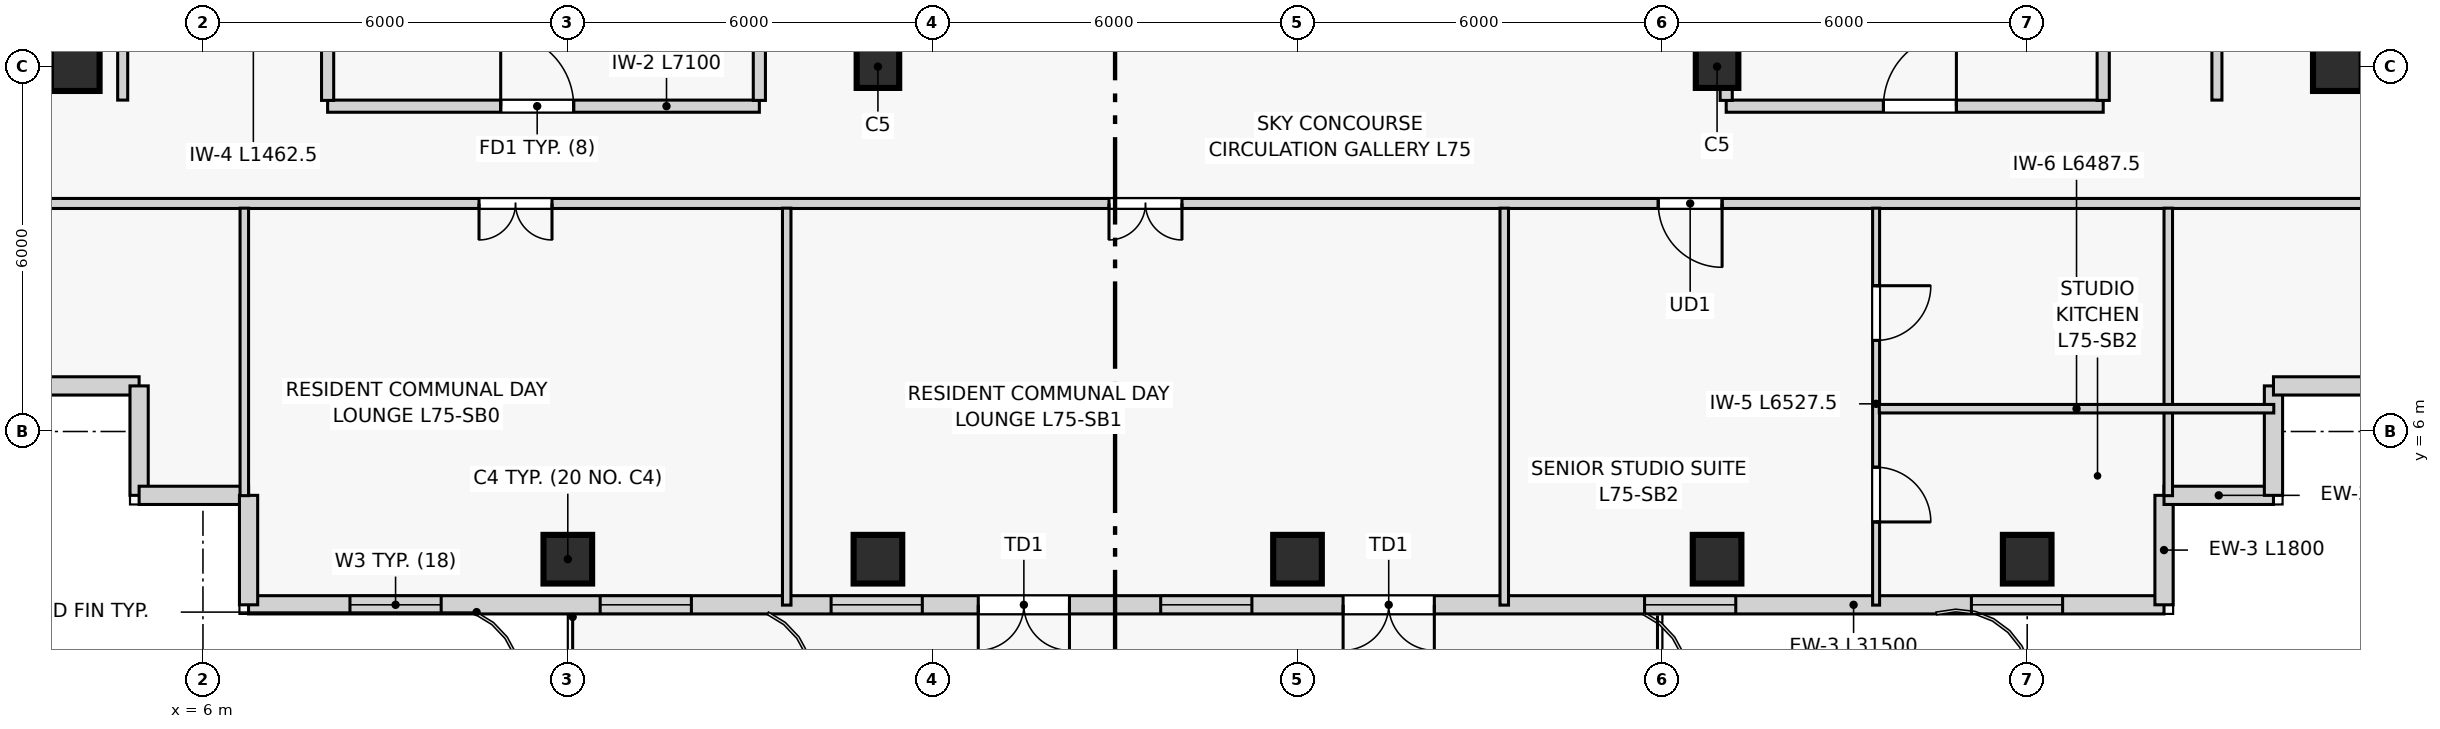
"""IFC4 building model, lengths in metres.
Left out: names, types, materials, properties, quantities, classifications, styles, units other than length and angle.
Written with IfcOpenShell. Run it as: python <this file> out.ifc"""

import sys

from ifc_helpers import new_model, si_unit, direction, frame, frame_2d, origin, origin_2d, place, context, subcontext, project, spatial, rectangle, extrude, source, transform, mapped, element, fill, save


model = new_model("IFC4")
c1 = context("Model", 3, precision=1e-05, world=origin(), true_north=direction((0.0, 1.0)))
c2 = subcontext(c1, "Body", "Model", "MODEL_VIEW")
j1 = project(units=[si_unit("LENGTHUNIT", "METRE"), si_unit("PLANEANGLEUNIT", "RADIAN")], contexts=[c1])
p1 = place(None, origin())
s1 = spatial("IfcSite", under=j1, at=p1, CompositionType="ELEMENT")
p2 = place(p1, origin())
s2 = spatial("IfcBuilding", under=s1, at=p2, CompositionType="ELEMENT")
p3 = place(p2, frame((0.0, 0.0, 285.3)))
s3 = spatial("IfcBuildingStorey", under=s2, at=p3, CompositionType="ELEMENT", Elevation=285.3)
m1 = source(origin(), c2, "Body", "SweptSolid", [
    extrude(rectangle(XDim=0.8, YDim=0.8, at=origin_2d()), origin(), (0.0, 0.0, 1.0), 4.2),
])
for number, where, z_axis, x_axis in (
    (1, (12.0, 3.9, 0.0), (0.0, 0.0, 1.0), (1.0, 0.0, 0.0)),
    (2, (17.1, 3.9, 0.0), (0.0, 0.0, 1.0), (1.0, 0.0, 0.0)),
    (3, (24.0, 3.9, 0.0), (0.0, 0.0, 1.0), (1.0, 0.0, 0.0)),
    (4, (30.9, 3.9, 0.0), (0.0, 0.0, 1.0), (1.0, 0.0, 0.0)),
    (5, (36.0, 3.9, 0.0), (0.0, 0.0, 1.0), (1.0, 0.0, 0.0)),
    (6, (3.9, 12.0, 0.0), (0.0, 0.0, 1.0), (1.0, 0.0, 0.0)),
    (7, (41.1, 12.0, 0.0), (0.0, 0.0, 1.0), (1.0, 0.0, 0.0)),
):
    element("IfcColumn", number, at=place(p3, frame(where, z_axis=z_axis, x_axis=x_axis)), inside=s3, PredefinedType="COLUMN", context=c2, shape_type="MappedRepresentation", body=[
        mapped(m1, transform((0.0, 0.0, 0.0), scale=1.0)),
    ])
m2 = source(origin(), c2, "Body", "SweptSolid", [
    extrude(rectangle(XDim=0.7, YDim=0.7, at=origin_2d()), origin(), (0.0, 0.0, 1.0), 4.2),
])
for number, where, z_axis, x_axis in (
    (8, (17.1, 12.0, 0.0), (0.0, 0.0, 1.0), (1.0, 0.0, 0.0)),
    (9, (30.9, 12.0, 0.0), (0.0, 0.0, 1.0), (1.0, 0.0, 0.0)),
):
    element("IfcColumn", number, at=place(p3, frame(where, z_axis=z_axis, x_axis=x_axis)), inside=s3, PredefinedType="COLUMN", context=c2, shape_type="MappedRepresentation", body=[
        mapped(m2, transform((0.0, 0.0, 0.0), scale=1.0)),
    ])
p4 = place(p3, frame((6.75, 3.15, 0.0), z_axis=(0.0, 0.0, 1.0), x_axis=(1.0, 0.0, 0.0)))
e10 = element("IfcWall", 10, at=p4, inside=s3, PredefinedType="SOLIDWALL", context=c2, shape_type="SweptSolid", body=[
    extrude(rectangle(XDim=31.5, YDim=0.3, at=frame_2d((15.75, 0.0))), origin(), (0.0, 0.0, 1.0), 3.92),
])
p5 = place(p4, frame((1.667, 0.0, 0.85)))
e11 = element("IfcOpeningElement", 11, at=p5, cuts=e10, PredefinedType="OPENING", context=c2, shape_type="SweptSolid", body=[
    extrude(rectangle(XDim=1.5, YDim=1.8, at=frame_2d((0.75, 0.9))), frame((0.0, 0.16, 0.0), z_axis=(0.0, -1.0, 0.0), x_axis=(1.0, 0.0, 0.0)), (0.0, 0.0, 1.0), 0.32),
])
p6 = place(p4, frame((5.782, 0.0, 0.85)))
e12 = element("IfcOpeningElement", 12, at=p6, cuts=e10, PredefinedType="OPENING", context=c2, shape_type="SweptSolid", body=[
    extrude(rectangle(XDim=1.5, YDim=1.8, at=frame_2d((0.75, 0.9))), frame((0.0, 0.16, 0.0), z_axis=(0.0, -1.0, 0.0), x_axis=(1.0, 0.0, 0.0)), (0.0, 0.0, 1.0), 0.32),
])
p7 = place(p4, frame((9.58, 0.0, 0.85)))
e13 = element("IfcOpeningElement", 13, at=p7, cuts=e10, PredefinedType="OPENING", context=c2, shape_type="SweptSolid", body=[
    extrude(rectangle(XDim=1.5, YDim=1.8, at=frame_2d((0.75, 0.9))), frame((0.0, 0.16, 0.0), z_axis=(0.0, -1.0, 0.0), x_axis=(1.0, 0.0, 0.0)), (0.0, 0.0, 1.0), 0.32),
])
p8 = place(p4, frame((15.0, 0.0, 0.85)))
e14 = element("IfcOpeningElement", 14, at=p8, cuts=e10, PredefinedType="OPENING", context=c2, shape_type="SweptSolid", body=[
    extrude(rectangle(XDim=1.5, YDim=1.8, at=frame_2d((0.75, 0.9))), frame((0.0, 0.16, 0.0), z_axis=(0.0, -1.0, 0.0), x_axis=(1.0, 0.0, 0.0)), (0.0, 0.0, 1.0), 0.32),
])
p9 = place(p4, frame((22.958, 0.0, 0.85)))
e15 = element("IfcOpeningElement", 15, at=p9, cuts=e10, PredefinedType="OPENING", context=c2, shape_type="SweptSolid", body=[
    extrude(rectangle(XDim=1.5, YDim=1.8, at=frame_2d((0.75, 0.9))), frame((0.0, 0.16, 0.0), z_axis=(0.0, -1.0, 0.0), x_axis=(1.0, 0.0, 0.0)), (0.0, 0.0, 1.0), 0.32),
])
p10 = place(p4, frame((28.333, 0.0, 0.85)))
e16 = element("IfcOpeningElement", 16, at=p10, cuts=e10, PredefinedType="OPENING", context=c2, shape_type="SweptSolid", body=[
    extrude(rectangle(XDim=1.5, YDim=1.8, at=frame_2d((0.75, 0.9))), frame((0.0, 0.16, 0.0), z_axis=(0.0, -1.0, 0.0), x_axis=(1.0, 0.0, 0.0)), (0.0, 0.0, 1.0), 0.32),
])
p11 = place(p4, frame((12.0, 0.0, 0.0)))
e17 = element("IfcOpeningElement", 17, at=p11, cuts=e10, PredefinedType="OPENING", context=c2, shape_type="SweptSolid", body=[
    extrude(rectangle(XDim=1.5, YDim=2.3, at=frame_2d((0.75, 1.15))), frame((0.0, 0.16, 0.0), z_axis=(0.0, -1.0, 0.0), x_axis=(1.0, 0.0, 0.0)), (0.0, 0.0, 1.0), 0.32),
])
p12 = place(p4, frame((18.0, 0.0, 0.0)))
e18 = element("IfcOpeningElement", 18, at=p12, cuts=e10, PredefinedType="OPENING", context=c2, shape_type="SweptSolid", body=[
    extrude(rectangle(XDim=1.5, YDim=2.3, at=frame_2d((0.75, 1.15))), frame((0.0, 0.16, 0.0), z_axis=(0.0, -1.0, 0.0), x_axis=(1.0, 0.0, 0.0)), (0.0, 0.0, 1.0), 0.32),
])
for number, where, z_axis, x_axis in (
    (19, (38.25, 3.15, 0.0), (0.0, 0.0, 1.0), (0.0, 1.0, 0.0)),
    (20, (38.25, 4.95, 0.0), (0.0, 0.0, 1.0), (1.0, 0.0, 0.0)),
    (21, (40.05, 4.95, 0.0), (0.0, 0.0, 1.0), (0.0, 1.0, 0.0)),
    (22, (40.05, 6.75, 0.0), (0.0, 0.0, 1.0), (1.0, 0.0, 0.0)),
    (23, (3.15, 6.75, 0.0), (0.0, 0.0, 1.0), (1.0, 0.0, 0.0)),
    (24, (4.95, 6.75, 0.0), (0.0, 0.0, 1.0), (0.0, -1.0, 0.0)),
    (25, (4.95, 4.95, 0.0), (0.0, 0.0, 1.0), (1.0, 0.0, 0.0)),
    (26, (6.75, 4.95, 0.0), (0.0, 0.0, 1.0), (0.0, -1.0, 0.0)),
):
    element("IfcWall", number, at=place(p3, frame(where, z_axis=z_axis, x_axis=x_axis)), inside=s3, PredefinedType="SOLIDWALL", context=c2, shape_type="SweptSolid", body=[
        extrude(rectangle(XDim=1.8, YDim=0.3, at=frame_2d((0.9, 0.0))), origin(), (0.0, 0.0, 1.0), 3.92),
    ])
p13 = place(p3, frame((8.05, 11.35, 0.0), z_axis=(0.0, 0.0, 1.0), x_axis=(1.0, 0.0, 0.0)))
e27 = element("IfcWall", 27, at=p13, inside=s3, PredefinedType="PARTITIONING", context=c2, shape_type="SweptSolid", body=[
    extrude(rectangle(XDim=7.1, YDim=0.2, at=frame_2d((3.55, 0.0))), origin(), (0.0, 0.0, 1.0), 3.92),
])
p14 = place(p13, frame((2.846, 0.0, 0.0)))
e28 = element("IfcOpeningElement", 28, at=p14, cuts=e27, PredefinedType="OPENING", context=c2, shape_type="SweptSolid", body=[
    extrude(rectangle(XDim=1.2, YDim=2.2, at=frame_2d((0.6, 1.1))), frame((0.0, 0.11, 0.0), z_axis=(0.0, -1.0, 0.0), x_axis=(1.0, 0.0, 0.0)), (0.0, 0.0, 1.0), 0.22),
])
for number, where, z_axis, x_axis in (
    (29, (8.05, 11.445, 0.0), (0.0, 0.0, 1.0), (0.0, 1.0, 0.0)),
    (30, (15.15, 11.445, 0.0), (0.0, 0.0, 1.0), (0.0, 1.0, 0.0)),
):
    element("IfcWall", number, at=place(p3, frame(where, z_axis=z_axis, x_axis=x_axis)), inside=s3, PredefinedType="PARTITIONING", context=c2, shape_type="SweptSolid", body=[
        extrude(rectangle(XDim=3.335, YDim=0.2, at=frame_2d((1.667, 0.0))), origin(), (0.0, 0.0, 1.0), 3.92),
    ])
p15 = place(p3, frame((31.05, 11.35, 0.0), z_axis=(0.0, 0.0, 1.0), x_axis=(1.0, 0.0, 0.0)))
e31 = element("IfcWall", 31, at=p15, inside=s3, PredefinedType="PARTITIONING", context=c2, shape_type="SweptSolid", body=[
    extrude(rectangle(XDim=6.2, YDim=0.2, at=frame_2d((3.1, 0.0))), origin(), (0.0, 0.0, 1.0), 3.92),
])
p16 = place(p15, frame((2.586, 0.0, 0.0)))
e32 = element("IfcOpeningElement", 32, at=p16, cuts=e31, PredefinedType="OPENING", context=c2, shape_type="SweptSolid", body=[
    extrude(rectangle(XDim=1.2, YDim=2.2, at=frame_2d((0.6, 1.1))), frame((0.0, 0.11, 0.0), z_axis=(0.0, -1.0, 0.0), x_axis=(1.0, 0.0, 0.0)), (0.0, 0.0, 1.0), 0.22),
])
p17 = place(p3, frame((31.05, 11.445, 0.0), z_axis=(0.0, 0.0, 1.0), x_axis=(0.0, 1.0, 0.0)))
e33 = element("IfcWall", 33, at=p17, inside=s3, PredefinedType="PARTITIONING", context=c2, shape_type="SweptSolid", body=[
    extrude(rectangle(XDim=3.335, YDim=0.2, at=frame_2d((1.667, 0.0))), origin(), (0.0, 0.0, 1.0), 3.07),
])
p18 = place(p3, frame((37.25, 11.445, 0.0), z_axis=(0.0, 0.0, 1.0), x_axis=(0.0, 1.0, 0.0)))
e34 = element("IfcWall", 34, at=p18, inside=s3, PredefinedType="PARTITIONING", context=c2, shape_type="SweptSolid", body=[
    extrude(rectangle(XDim=3.335, YDim=0.2, at=frame_2d((1.667, 0.0))), origin(), (0.0, 0.0, 1.0), 3.92),
])
p19 = place(p3, frame((3.145, 9.75, 0.0), z_axis=(0.0, 0.0, 1.0), x_axis=(1.0, 0.0, 0.0)))
e35 = element("IfcWall", 35, at=p19, inside=s3, PredefinedType="PARTITIONING", context=c2, shape_type="SweptSolid", body=[
    extrude(rectangle(XDim=38.71, YDim=0.165, at=frame_2d((19.355, 0.0))), origin(), (0.0, 0.0, 1.0), 3.92),
])
p20 = place(p19, frame((7.395, 0.0, 0.0)))
e36 = element("IfcOpeningElement", 36, at=p20, cuts=e35, PredefinedType="OPENING", context=c2, shape_type="SweptSolid", body=[
    extrude(rectangle(XDim=1.2, YDim=2.2, at=frame_2d((0.6, 1.1))), frame((0.0, 0.093, 0.0), z_axis=(0.0, -1.0, 0.0), x_axis=(1.0, 0.0, 0.0)), (0.0, 0.0, 1.0), 0.185),
])
p21 = place(p19, frame((17.755, 0.0, 0.0)))
e37 = element("IfcOpeningElement", 37, at=p21, cuts=e35, PredefinedType="OPENING", context=c2, shape_type="SweptSolid", body=[
    extrude(rectangle(XDim=1.2, YDim=2.2, at=frame_2d((0.6, 1.1))), frame((0.0, 0.093, 0.0), z_axis=(0.0, -1.0, 0.0), x_axis=(1.0, 0.0, 0.0)), (0.0, 0.0, 1.0), 0.185),
])
p22 = place(p19, frame((26.788, 0.0, 0.0)))
e38 = element("IfcOpeningElement", 38, at=p22, cuts=e35, PredefinedType="OPENING", context=c2, shape_type="SweptSolid", body=[
    extrude(rectangle(XDim=1.05, YDim=2.15, at=frame_2d((0.525, 1.075))), frame((0.0, 0.093, 0.0), z_axis=(0.0, -1.0, 0.0), x_axis=(1.0, 0.0, 0.0)), (0.0, 0.0, 1.0), 0.185),
])
p23 = place(p3, frame((4.68, 11.45, 0.0), z_axis=(0.0, 0.0, 1.0), x_axis=(0.0, 1.0, 0.0)))
e39 = element("IfcWall", 39, at=p23, inside=s3, PredefinedType="PARTITIONING", context=c2, shape_type="SweptSolid", body=[
    extrude(rectangle(XDim=3.7, YDim=0.165, at=frame_2d((1.85, 0.0))), origin(), (0.0, 0.0, 1.0), 3.92),
])
p24 = place(p23, frame((1.475, 0.0, 0.0)))
e40 = element("IfcOpeningElement", 40, at=p24, cuts=e39, PredefinedType="OPENING", context=c2, shape_type="SweptSolid", body=[
    extrude(rectangle(XDim=0.95, YDim=2.1, at=frame_2d((0.475, 1.05))), frame((0.0, 0.093, 0.0), z_axis=(0.0, -1.0, 0.0), x_axis=(1.0, 0.0, 0.0)), (0.0, 0.0, 1.0), 0.185),
])
p25 = place(p3, frame((39.12, 11.45, 0.0), z_axis=(0.0, 0.0, 1.0), x_axis=(0.0, 1.0, 0.0)))
e41 = element("IfcWall", 41, at=p25, inside=s3, PredefinedType="PARTITIONING", context=c2, shape_type="SweptSolid", body=[
    extrude(rectangle(XDim=18.9, YDim=0.165, at=frame_2d((9.45, 0.0))), origin(), (0.0, 0.0, 1.0), 3.92),
])
p26 = place(p25, frame((2.05, 0.0, 0.0)))
e42 = element("IfcOpeningElement", 42, at=p26, cuts=e41, PredefinedType="OPENING", context=c2, shape_type="SweptSolid", body=[
    extrude(rectangle(XDim=0.95, YDim=2.1, at=frame_2d((0.475, 1.05))), frame((0.0, 0.093, 0.0), z_axis=(0.0, -1.0, 0.0), x_axis=(1.0, 0.0, 0.0)), (0.0, 0.0, 1.0), 0.185),
])
p27 = place(p3, frame((6.68, 4.945, 0.0), z_axis=(0.0, 0.0, 1.0), x_axis=(0.0, 1.0, 0.0)))
e43 = element("IfcWall", 43, at=p27, inside=s3, PredefinedType="PARTITIONING", context=c2, shape_type="SweptSolid", body=[
    extrude(rectangle(XDim=4.728, YDim=0.14, at=frame_2d((2.364, 0.0))), origin(), (0.0, 0.0, 1.0), 3.92),
])
for number, where, z_axis, x_axis in (
    (44, (15.6, 3.145, 0.0), (0.0, 0.0, 1.0), (0.0, 1.0, 0.0)),
    (45, (27.4, 3.145, 0.0), (0.0, 0.0, 1.0), (0.0, 1.0, 0.0)),
):
    element("IfcWall", number, at=place(p3, frame(where, z_axis=z_axis, x_axis=x_axis)), inside=s3, PredefinedType="PARTITIONING", context=c2, shape_type="SweptSolid", body=[
        extrude(rectangle(XDim=6.528, YDim=0.14, at=frame_2d((3.264, 0.0))), origin(), (0.0, 0.0, 1.0), 3.92),
    ])
p28 = place(p3, frame((38.32, 4.945, 0.0), z_axis=(0.0, 0.0, 1.0), x_axis=(0.0, 1.0, 0.0)))
e46 = element("IfcWall", 46, at=p28, inside=s3, PredefinedType="PARTITIONING", context=c2, shape_type="SweptSolid", body=[
    extrude(rectangle(XDim=4.728, YDim=0.14, at=frame_2d((2.364, 0.0))), origin(), (0.0, 0.0, 1.0), 3.92),
])
p29 = place(p3, frame((33.515, 3.145, 0.0), z_axis=(0.0, 0.0, 1.0), x_axis=(0.0, 1.0, 0.0)))
e47 = element("IfcWall", 47, at=p29, inside=s3, PredefinedType="PARTITIONING", context=c2, shape_type="SweptSolid", body=[
    extrude(rectangle(XDim=6.528, YDim=0.115, at=frame_2d((3.264, 0.0))), origin(), (0.0, 0.0, 1.0), 3.92),
])
p30 = place(p29, frame((1.367, 0.0, 0.0)))
e48 = element("IfcOpeningElement", 48, at=p30, cuts=e47, PredefinedType="OPENING", context=c2, shape_type="SweptSolid", body=[
    extrude(rectangle(XDim=0.9, YDim=2.1, at=frame_2d((0.45, 1.05))), frame((0.0, 0.067, 0.0), z_axis=(0.0, -1.0, 0.0), x_axis=(1.0, 0.0, 0.0)), (0.0, 0.0, 1.0), 0.135),
])
p31 = place(p29, frame((4.353, 0.0, 0.0)))
e49 = element("IfcOpeningElement", 49, at=p31, cuts=e47, PredefinedType="OPENING", context=c2, shape_type="SweptSolid", body=[
    extrude(rectangle(XDim=0.9, YDim=2.1, at=frame_2d((0.45, 1.05))), frame((0.0, 0.067, 0.0), z_axis=(0.0, -1.0, 0.0), x_axis=(1.0, 0.0, 0.0)), (0.0, 0.0, 1.0), 0.135),
])
p32 = place(p3, frame((33.567, 6.375, 0.0), z_axis=(0.0, 0.0, 1.0), x_axis=(1.0, 0.0, 0.0)))
e50 = element("IfcWall", 50, at=p32, inside=s3, PredefinedType="PLUMBINGWALL", context=c2, shape_type="SweptSolid", body=[
    extrude(rectangle(XDim=6.488, YDim=0.14, at=frame_2d((3.244, 0.0))), origin(), (0.0, 0.0, 1.0), 3.92),
])
m3 = source(origin(), c2, "Body", "SweptSolid", [
    extrude(rectangle(XDim=1.5, YDim=1.8, at=frame_2d((0.75, 0.9))), frame((0.0, 0.03, 0.0), z_axis=(0.0, -1.0, 0.0), x_axis=(1.0, 0.0, 0.0)), (0.0, 0.0, 1.0), 0.06),
])
p33 = place(p5, origin())
e51 = element("IfcWindow", 51, at=p33, inside=s3, PartitioningType="SINGLE_PANEL", PredefinedType="WINDOW", context=c2, shape_type="MappedRepresentation", body=[
    mapped(m3, transform((0.0, 0.0, 0.0), scale=1.0)),
])
fill(e11, e51)
p34 = place(p6, origin())
e52 = element("IfcWindow", 52, at=p34, inside=s3, PartitioningType="SINGLE_PANEL", PredefinedType="WINDOW", context=c2, shape_type="MappedRepresentation", body=[
    mapped(m3, transform((0.0, 0.0, 0.0), scale=1.0)),
])
fill(e12, e52)
p35 = place(p7, origin())
e53 = element("IfcWindow", 53, at=p35, inside=s3, PartitioningType="SINGLE_PANEL", PredefinedType="WINDOW", context=c2, shape_type="MappedRepresentation", body=[
    mapped(m3, transform((0.0, 0.0, 0.0), scale=1.0)),
])
fill(e13, e53)
p36 = place(p8, origin())
e54 = element("IfcWindow", 54, at=p36, inside=s3, PartitioningType="SINGLE_PANEL", PredefinedType="WINDOW", context=c2, shape_type="MappedRepresentation", body=[
    mapped(m3, transform((0.0, 0.0, 0.0), scale=1.0)),
])
fill(e14, e54)
p37 = place(p9, origin())
e55 = element("IfcWindow", 55, at=p37, inside=s3, PartitioningType="SINGLE_PANEL", PredefinedType="WINDOW", context=c2, shape_type="MappedRepresentation", body=[
    mapped(m3, transform((0.0, 0.0, 0.0), scale=1.0)),
])
fill(e15, e55)
p38 = place(p10, origin())
e56 = element("IfcWindow", 56, at=p38, inside=s3, PartitioningType="SINGLE_PANEL", PredefinedType="WINDOW", context=c2, shape_type="MappedRepresentation", body=[
    mapped(m3, transform((0.0, 0.0, 0.0), scale=1.0)),
])
fill(e16, e56)
m4 = source(origin(), c2, "Body", "SweptSolid", [
    extrude(rectangle(XDim=1.5, YDim=2.3, at=frame_2d((0.75, 1.15))), frame((0.0, 0.025, 0.0), z_axis=(0.0, -1.0, 0.0), x_axis=(1.0, 0.0, 0.0)), (0.0, 0.0, 1.0), 0.05),
])
p39 = place(p11, frame((1.5, 0.0, 0.0), z_axis=(0.0, 0.0, 1.0), x_axis=(-1.0, 0.0, 0.0)))
e57 = element("IfcDoor", 57, at=p39, inside=s3, OperationType="DOUBLE_DOOR_SINGLE_SWING", PredefinedType="DOOR", context=c2, shape_type="MappedRepresentation", body=[
    mapped(m4, transform((0.0, 0.0, 0.0), scale=1.0)),
])
fill(e17, e57)
p40 = place(p12, frame((1.5, 0.0, 0.0), z_axis=(0.0, 0.0, 1.0), x_axis=(-1.0, 0.0, 0.0)))
e58 = element("IfcDoor", 58, at=p40, inside=s3, OperationType="DOUBLE_DOOR_SINGLE_SWING", PredefinedType="DOOR", context=c2, shape_type="MappedRepresentation", body=[
    mapped(m4, transform((0.0, 0.0, 0.0), scale=1.0)),
])
fill(e18, e58)
m5 = source(origin(), c2, "Body", "SweptSolid", [
    extrude(rectangle(XDim=1.2, YDim=2.2, at=frame_2d((0.6, 1.1))), frame((0.0, 0.025, 0.0), z_axis=(0.0, -1.0, 0.0), x_axis=(1.0, 0.0, 0.0)), (0.0, 0.0, 1.0), 0.05),
])
p41 = place(p14, origin())
e59 = element("IfcDoor", 59, at=p41, inside=s3, OperationType="SINGLE_SWING_LEFT", PredefinedType="DOOR", context=c2, shape_type="MappedRepresentation", body=[
    mapped(m5, transform((0.0, 0.0, 0.0), scale=1.0)),
])
fill(e28, e59)
p42 = place(p16, origin())
e60 = element("IfcDoor", 60, at=p42, inside=s3, OperationType="SINGLE_SWING_RIGHT", PredefinedType="DOOR", context=c2, shape_type="MappedRepresentation", body=[
    mapped(m5, transform((0.0, 0.0, 0.0), scale=1.0)),
])
fill(e32, e60)
p43 = place(p20, frame((1.2, 0.0, 0.0), z_axis=(0.0, 0.0, 1.0), x_axis=(-1.0, 0.0, 0.0)))
e61 = element("IfcDoor", 61, at=p43, inside=s3, OperationType="DOUBLE_DOOR_SINGLE_SWING", PredefinedType="DOOR", context=c2, shape_type="MappedRepresentation", body=[
    mapped(m5, transform((0.0, 0.0, 0.0), scale=1.0)),
])
fill(e36, e61)
p44 = place(p21, frame((1.2, 0.0, 0.0), z_axis=(0.0, 0.0, 1.0), x_axis=(-1.0, 0.0, 0.0)))
e62 = element("IfcDoor", 62, at=p44, inside=s3, OperationType="DOUBLE_DOOR_SINGLE_SWING", PredefinedType="DOOR", context=c2, shape_type="MappedRepresentation", body=[
    mapped(m5, transform((0.0, 0.0, 0.0), scale=1.0)),
])
fill(e37, e62)
m6 = source(origin(), c2, "Body", "SweptSolid", [
    extrude(rectangle(XDim=1.05, YDim=2.15, at=frame_2d((0.525, 1.075))), frame((0.0, 0.025, 0.0), z_axis=(0.0, -1.0, 0.0), x_axis=(1.0, 0.0, 0.0)), (0.0, 0.0, 1.0), 0.05),
])
p45 = place(p22, frame((1.05, 0.0, 0.0), z_axis=(0.0, 0.0, 1.0), x_axis=(-1.0, 0.0, 0.0)))
e63 = element("IfcDoor", 63, at=p45, inside=s3, OperationType="SINGLE_SWING_LEFT", PredefinedType="DOOR", context=c2, shape_type="MappedRepresentation", body=[
    mapped(m6, transform((0.0, 0.0, 0.0), scale=1.0)),
])
fill(e38, e63)
m7 = source(origin(), c2, "Body", "SweptSolid", [
    extrude(rectangle(XDim=0.9, YDim=2.1, at=frame_2d((0.45, 1.05))), frame((0.0, 0.025, 0.0), z_axis=(0.0, -1.0, 0.0), x_axis=(1.0, 0.0, 0.0)), (0.0, 0.0, 1.0), 0.05),
])
p46 = place(p30, frame((0.9, 0.0, 0.0), z_axis=(0.0, 0.0, 1.0), x_axis=(-1.0, 0.0, 0.0)))
e64 = element("IfcDoor", 64, at=p46, inside=s3, OperationType="SINGLE_SWING_RIGHT", PredefinedType="DOOR", context=c2, shape_type="MappedRepresentation", body=[
    mapped(m7, transform((0.0, 0.0, 0.0), scale=1.0)),
])
fill(e48, e64)
p47 = place(p31, frame((0.9, 0.0, 0.0), z_axis=(0.0, 0.0, 1.0), x_axis=(-1.0, 0.0, 0.0)))
e65 = element("IfcDoor", 65, at=p47, inside=s3, OperationType="SINGLE_SWING_LEFT", PredefinedType="DOOR", context=c2, shape_type="MappedRepresentation", body=[
    mapped(m7, transform((0.0, 0.0, 0.0), scale=1.0)),
])
fill(e49, e65)
save(model, sys.argv[1])
